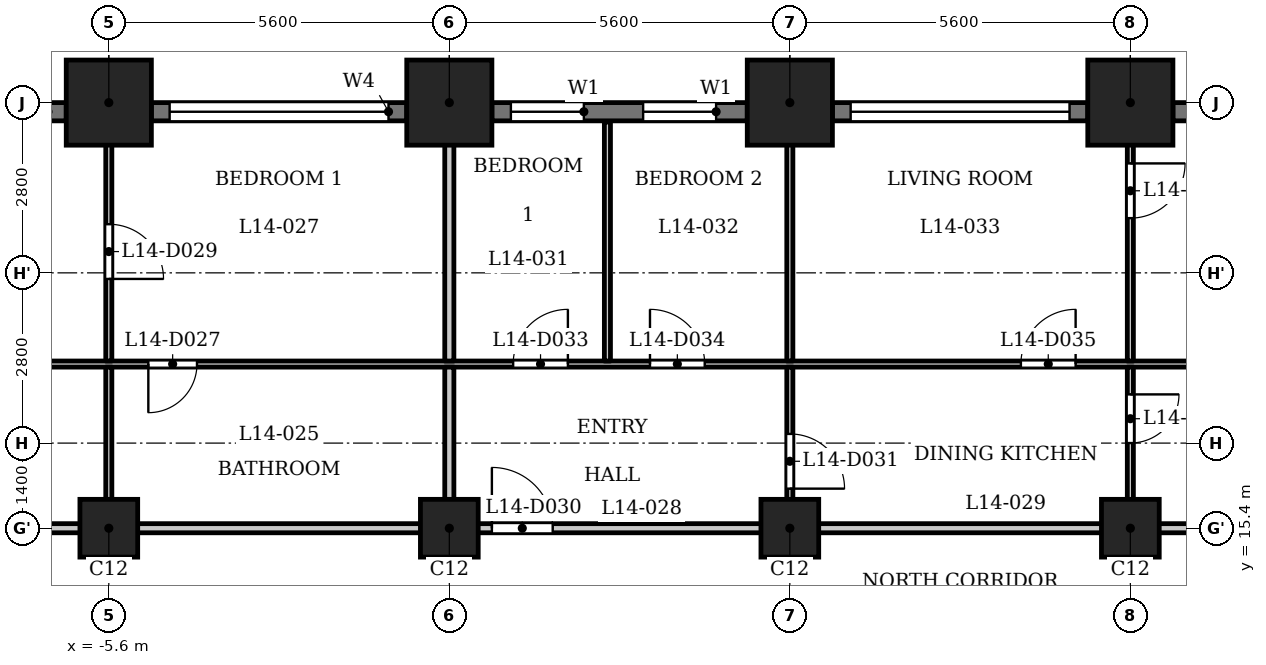
"""IFC4 building model, lengths in metres.
Left out: names, types, materials, properties, quantities, classifications, styles, units other than length and angle.
Written with IfcOpenShell. Run it as: python <this file> out.ifc"""

import sys

from ifc_helpers import new_model, si_unit, direction, frame, frame_2d, origin, origin_2d, place, context, subcontext, project, spatial, rectangle, extrude, element, fill, save


model = new_model("IFC4")
c1 = context("Model", 3, precision=1e-05, world=origin(), true_north=direction((0.0, 1.0)))
c2 = subcontext(c1, "Body", "Model", "MODEL_VIEW")
j1 = project(units=[si_unit("LENGTHUNIT", "METRE"), si_unit("PLANEANGLEUNIT", "RADIAN")], contexts=[c1])
p1 = place(None, origin())
s1 = spatial("IfcSite", under=j1, at=p1, CompositionType="ELEMENT")
p2 = place(p1, origin())
s2 = spatial("IfcBuilding", under=s1, at=p2, CompositionType="ELEMENT")
p3 = place(p2, frame((0.0, 0.0, 58.5)))
s3 = spatial("IfcBuildingStorey", under=s2, at=p3, CompositionType="ELEMENT", Elevation=58.5)
for number, where, z_axis, x_axis in (
    (1, (11.2, 22.4, 0.0), (0.0, 0.0, 1.0), (1.0, 0.0, 0.0)),
    (2, (5.6, 22.4, 0.0), (0.0, 0.0, 1.0), (1.0, 0.0, 0.0)),
    (3, (0.0, 22.4, 0.0), (0.0, 0.0, 1.0), (1.0, 0.0, 0.0)),
    (4, (-5.6, 22.4, 0.0), (0.0, 0.0, 1.0), (1.0, 0.0, 0.0)),
):
    element("IfcColumn", number, at=place(p3, frame(where, z_axis=z_axis, x_axis=x_axis)), inside=s3, PredefinedType="COLUMN", context=c2, shape_type="SweptSolid", body=[
        extrude(rectangle(XDim=1.4, YDim=1.4, at=origin_2d()), origin(), (0.0, 0.0, 1.0), 3.5),
    ])
for number, where, z_axis, x_axis in (
    (5, (-5.6, 15.4, 0.0), (0.0, 0.0, 1.0), (1.0, 0.0, 0.0)),
    (6, (0.0, 15.4, 0.0), (0.0, 0.0, 1.0), (1.0, 0.0, 0.0)),
    (7, (5.6, 15.4, 0.0), (0.0, 0.0, 1.0), (1.0, 0.0, 0.0)),
    (8, (11.2, 15.4, 0.0), (0.0, 0.0, 1.0), (1.0, 0.0, 0.0)),
):
    element("IfcColumn", number, at=place(p3, frame(where, z_axis=z_axis, x_axis=x_axis)), inside=s3, PredefinedType="COLUMN", context=c2, shape_type="SweptSolid", body=[
        extrude(rectangle(XDim=0.95, YDim=0.95, at=origin_2d()), origin(), (0.0, 0.0, 1.0), 3.5),
    ])
p4 = place(p3, frame((16.1, 22.25, 0.0), z_axis=(0.0, 0.0, 1.0), x_axis=(-1.0, 0.0, 0.0)))
e9 = element("IfcWall", 9, at=p4, inside=s3, PredefinedType="SOLIDWALL", context=c2, shape_type="SweptSolid", body=[
    extrude(rectangle(XDim=4.2, YDim=0.3, at=frame_2d((2.1, 0.0))), origin(), (0.0, 0.0, 1.0), 2.35),
])
p5 = place(p4, frame((0.3, 0.0, 1.2)))
e10 = element("IfcOpeningElement", 10, at=p5, cuts=e9, PredefinedType="OPENING", context=c2, shape_type="SweptSolid", body=[
    extrude(rectangle(XDim=3.6, YDim=0.95, at=frame_2d((1.8, 0.475))), frame((0.0, 0.16, 0.0), z_axis=(0.0, -1.0, 0.0), x_axis=(1.0, 0.0, 0.0)), (0.0, 0.0, 1.0), 0.32),
])
p6 = place(p3, frame((10.5, 22.25, 0.0), z_axis=(0.0, 0.0, 1.0), x_axis=(-1.0, 0.0, 0.0)))
e11 = element("IfcWall", 11, at=p6, inside=s3, PredefinedType="SOLIDWALL", context=c2, shape_type="SweptSolid", body=[
    extrude(rectangle(XDim=4.2, YDim=0.3, at=frame_2d((2.1, 0.0))), origin(), (0.0, 0.0, 1.0), 2.35),
])
p7 = place(p6, frame((0.3, 0.0, 1.2)))
e12 = element("IfcOpeningElement", 12, at=p7, cuts=e11, PredefinedType="OPENING", context=c2, shape_type="SweptSolid", body=[
    extrude(rectangle(XDim=3.6, YDim=0.95, at=frame_2d((1.8, 0.475))), frame((0.0, 0.16, 0.0), z_axis=(0.0, -1.0, 0.0), x_axis=(1.0, 0.0, 0.0)), (0.0, 0.0, 1.0), 0.32),
])
p8 = place(p3, frame((4.9, 22.25, 0.0), z_axis=(0.0, 0.0, 1.0), x_axis=(-1.0, 0.0, 0.0)))
e13 = element("IfcWall", 13, at=p8, inside=s3, PredefinedType="SOLIDWALL", context=c2, shape_type="SweptSolid", body=[
    extrude(rectangle(XDim=4.2, YDim=0.3, at=frame_2d((2.1, 0.0))), origin(), (0.0, 0.0, 1.0), 2.35),
])
p9 = place(p8, frame((0.512, 0.0, 0.6)))
e14 = element("IfcOpeningElement", 14, at=p9, cuts=e13, PredefinedType="OPENING", context=c2, shape_type="SweptSolid", body=[
    extrude(rectangle(XDim=1.2, YDim=1.55, at=frame_2d((0.6, 0.775))), frame((0.0, 0.16, 0.0), z_axis=(0.0, -1.0, 0.0), x_axis=(1.0, 0.0, 0.0)), (0.0, 0.0, 1.0), 0.32),
])
p10 = place(p8, frame((2.688, 0.0, 0.6)))
e15 = element("IfcOpeningElement", 15, at=p10, cuts=e13, PredefinedType="OPENING", context=c2, shape_type="SweptSolid", body=[
    extrude(rectangle(XDim=1.2, YDim=1.55, at=frame_2d((0.6, 0.775))), frame((0.0, 0.16, 0.0), z_axis=(0.0, -1.0, 0.0), x_axis=(1.0, 0.0, 0.0)), (0.0, 0.0, 1.0), 0.32),
])
p11 = place(p3, frame((-0.7, 22.25, 0.0), z_axis=(0.0, 0.0, 1.0), x_axis=(-1.0, 0.0, 0.0)))
e16 = element("IfcWall", 16, at=p11, inside=s3, PredefinedType="SOLIDWALL", context=c2, shape_type="SweptSolid", body=[
    extrude(rectangle(XDim=4.2, YDim=0.3, at=frame_2d((2.1, 0.0))), origin(), (0.0, 0.0, 1.0), 2.35),
])
p12 = place(p11, frame((0.3, 0.0, 1.2)))
e17 = element("IfcOpeningElement", 17, at=p12, cuts=e16, PredefinedType="OPENING", context=c2, shape_type="SweptSolid", body=[
    extrude(rectangle(XDim=3.6, YDim=0.95, at=frame_2d((1.8, 0.475))), frame((0.0, 0.16, 0.0), z_axis=(0.0, -1.0, 0.0), x_axis=(1.0, 0.0, 0.0)), (0.0, 0.0, 1.0), 0.32),
])
p13 = place(p3, frame((-6.3, 22.25, 0.0), z_axis=(0.0, 0.0, 1.0), x_axis=(-1.0, 0.0, 0.0)))
e18 = element("IfcWall", 18, at=p13, inside=s3, PredefinedType="SOLIDWALL", context=c2, shape_type="SweptSolid", body=[
    extrude(rectangle(XDim=4.2, YDim=0.3, at=frame_2d((2.1, 0.0))), origin(), (0.0, 0.0, 1.0), 2.35),
])
p14 = place(p13, frame((0.3, 0.0, 1.2)))
e19 = element("IfcOpeningElement", 19, at=p14, cuts=e18, PredefinedType="OPENING", context=c2, shape_type="SweptSolid", body=[
    extrude(rectangle(XDim=3.6, YDim=0.95, at=frame_2d((1.8, 0.475))), frame((0.0, 0.16, 0.0), z_axis=(0.0, -1.0, 0.0), x_axis=(1.0, 0.0, 0.0)), (0.0, 0.0, 1.0), 0.32),
])
p15 = place(p3, frame((-27.484, 15.4, 0.0), z_axis=(0.0, 0.0, 1.0), x_axis=(1.0, 0.0, 0.0)))
e20 = element("IfcWall", 20, at=p15, inside=s3, PredefinedType="PARTITIONING", context=c2, shape_type="SweptSolid", body=[
    extrude(rectangle(XDim=54.968, YDim=0.15, at=frame_2d((27.484, 0.0))), origin(), (0.0, 0.0, 1.0), 3.2),
])
p16 = place(p15, frame((8.784, 0.0, 0.0)))
e21 = element("IfcOpeningElement", 21, at=p16, cuts=e20, PredefinedType="OPENING", context=c2, shape_type="SweptSolid", body=[
    extrude(rectangle(XDim=1.0, YDim=2.1, at=frame_2d((0.5, 1.05))), frame((0.0, 0.085, 0.0), z_axis=(0.0, -1.0, 0.0), x_axis=(1.0, 0.0, 0.0)), (0.0, 0.0, 1.0), 0.17),
])
p17 = place(p15, frame((12.034, 0.0, 0.0)))
e22 = element("IfcOpeningElement", 22, at=p17, cuts=e20, PredefinedType="OPENING", context=c2, shape_type="SweptSolid", body=[
    extrude(rectangle(XDim=1.0, YDim=2.1, at=frame_2d((0.5, 1.05))), frame((0.0, 0.085, 0.0), z_axis=(0.0, -1.0, 0.0), x_axis=(1.0, 0.0, 0.0)), (0.0, 0.0, 1.0), 0.17),
])
p18 = place(p15, frame((16.984, 0.0, 0.0)))
e23 = element("IfcOpeningElement", 23, at=p18, cuts=e20, PredefinedType="OPENING", context=c2, shape_type="SweptSolid", body=[
    extrude(rectangle(XDim=1.0, YDim=2.1, at=frame_2d((0.5, 1.05))), frame((0.0, 0.085, 0.0), z_axis=(0.0, -1.0, 0.0), x_axis=(1.0, 0.0, 0.0)), (0.0, 0.0, 1.0), 0.17),
])
p19 = place(p15, frame((28.184, 0.0, 0.0)))
e24 = element("IfcOpeningElement", 24, at=p19, cuts=e20, PredefinedType="OPENING", context=c2, shape_type="SweptSolid", body=[
    extrude(rectangle(XDim=1.0, YDim=2.1, at=frame_2d((0.5, 1.05))), frame((0.0, 0.085, 0.0), z_axis=(0.0, -1.0, 0.0), x_axis=(1.0, 0.0, 0.0)), (0.0, 0.0, 1.0), 0.17),
])
p20 = place(p15, frame((48.234, 0.0, 0.0)))
e25 = element("IfcOpeningElement", 25, at=p20, cuts=e20, PredefinedType="OPENING", context=c2, shape_type="SweptSolid", body=[
    extrude(rectangle(XDim=1.0, YDim=2.1, at=frame_2d((0.5, 1.05))), frame((0.0, 0.085, 0.0), z_axis=(0.0, -1.0, 0.0), x_axis=(1.0, 0.0, 0.0)), (0.0, 0.0, 1.0), 0.17),
])
p21 = place(p3, frame((-26.44, 18.1, 0.0), z_axis=(0.0, 0.0, 1.0), x_axis=(1.0, 0.0, 0.0)))
e26 = element("IfcWall", 26, at=p21, inside=s3, PredefinedType="PARTITIONING", context=c2, shape_type="SweptSolid", body=[
    extrude(rectangle(XDim=52.63, YDim=0.1, at=frame_2d((26.315, 0.0))), origin(), (0.0, 0.0, 1.0), 3.2),
])
p22 = place(p21, frame((2.626, 0.0, 0.0)))
e27 = element("IfcOpeningElement", 27, at=p22, cuts=e26, PredefinedType="OPENING", context=c2, shape_type="SweptSolid", body=[
    extrude(rectangle(XDim=0.8, YDim=2.1, at=frame_2d((0.4, 1.05))), frame((0.0, 0.06, 0.0), z_axis=(0.0, -1.0, 0.0), x_axis=(1.0, 0.0, 0.0)), (0.0, 0.0, 1.0), 0.12),
])
p23 = place(p21, frame((7.84, 0.0, 0.0)))
e28 = element("IfcOpeningElement", 28, at=p23, cuts=e26, PredefinedType="OPENING", context=c2, shape_type="SweptSolid", body=[
    extrude(rectangle(XDim=0.9, YDim=2.1, at=frame_2d((0.45, 1.05))), frame((0.0, 0.06, 0.0), z_axis=(0.0, -1.0, 0.0), x_axis=(1.0, 0.0, 0.0)), (0.0, 0.0, 1.0), 0.12),
])
p24 = place(p21, frame((13.79, 0.0, 0.0)))
e29 = element("IfcOpeningElement", 29, at=p24, cuts=e26, PredefinedType="OPENING", context=c2, shape_type="SweptSolid", body=[
    extrude(rectangle(XDim=0.8, YDim=2.1, at=frame_2d((0.4, 1.05))), frame((0.0, 0.06, 0.0), z_axis=(0.0, -1.0, 0.0), x_axis=(1.0, 0.0, 0.0)), (0.0, 0.0, 1.0), 0.12),
])
p25 = place(p21, frame((11.09, 0.0, 0.0)))
e30 = element("IfcOpeningElement", 30, at=p25, cuts=e26, PredefinedType="OPENING", context=c2, shape_type="SweptSolid", body=[
    extrude(rectangle(XDim=0.9, YDim=2.1, at=frame_2d((0.45, 1.05))), frame((0.0, 0.06, 0.0), z_axis=(0.0, -1.0, 0.0), x_axis=(1.0, 0.0, 0.0)), (0.0, 0.0, 1.0), 0.12),
])
p26 = place(p21, frame((21.49, 0.0, 0.0)))
e31 = element("IfcOpeningElement", 31, at=p26, cuts=e26, PredefinedType="OPENING", context=c2, shape_type="SweptSolid", body=[
    extrude(rectangle(XDim=0.8, YDim=2.1, at=frame_2d((0.4, 1.05))), frame((0.0, 0.06, 0.0), z_axis=(0.0, -1.0, 0.0), x_axis=(1.0, 0.0, 0.0)), (0.0, 0.0, 1.0), 0.12),
])
p27 = place(p21, frame((15.79, 0.0, 0.0)))
e32 = element("IfcOpeningElement", 32, at=p27, cuts=e26, PredefinedType="OPENING", context=c2, shape_type="SweptSolid", body=[
    extrude(rectangle(XDim=0.9, YDim=2.1, at=frame_2d((0.45, 1.05))), frame((0.0, 0.06, 0.0), z_axis=(0.0, -1.0, 0.0), x_axis=(1.0, 0.0, 0.0)), (0.0, 0.0, 1.0), 0.12),
])
p28 = place(p21, frame((27.49, 0.0, 0.0)))
e33 = element("IfcOpeningElement", 33, at=p28, cuts=e26, PredefinedType="OPENING", context=c2, shape_type="SweptSolid", body=[
    extrude(rectangle(XDim=0.9, YDim=2.1, at=frame_2d((0.45, 1.05))), frame((0.0, 0.06, 0.0), z_axis=(0.0, -1.0, 0.0), x_axis=(1.0, 0.0, 0.0)), (0.0, 0.0, 1.0), 0.12),
])
p29 = place(p21, frame((29.74, 0.0, 0.0)))
e34 = element("IfcOpeningElement", 34, at=p29, cuts=e26, PredefinedType="OPENING", context=c2, shape_type="SweptSolid", body=[
    extrude(rectangle(XDim=0.9, YDim=2.1, at=frame_2d((0.45, 1.05))), frame((0.0, 0.06, 0.0), z_axis=(0.0, -1.0, 0.0), x_axis=(1.0, 0.0, 0.0)), (0.0, 0.0, 1.0), 0.12),
])
p30 = place(p21, frame((35.84, 0.0, 0.0)))
e35 = element("IfcOpeningElement", 35, at=p30, cuts=e26, PredefinedType="OPENING", context=c2, shape_type="SweptSolid", body=[
    extrude(rectangle(XDim=0.9, YDim=2.1, at=frame_2d((0.45, 1.05))), frame((0.0, 0.06, 0.0), z_axis=(0.0, -1.0, 0.0), x_axis=(1.0, 0.0, 0.0)), (0.0, 0.0, 1.0), 0.12),
])
p31 = place(p21, frame((50.74, 0.0, 0.0)))
e36 = element("IfcOpeningElement", 36, at=p31, cuts=e26, PredefinedType="OPENING", context=c2, shape_type="SweptSolid", body=[
    extrude(rectangle(XDim=0.8, YDim=2.1, at=frame_2d((0.4, 1.05))), frame((0.0, 0.06, 0.0), z_axis=(0.0, -1.0, 0.0), x_axis=(1.0, 0.0, 0.0)), (0.0, 0.0, 1.0), 0.12),
])
p32 = place(p21, frame((47.29, 0.0, 0.0)))
e37 = element("IfcOpeningElement", 37, at=p32, cuts=e26, PredefinedType="OPENING", context=c2, shape_type="SweptSolid", body=[
    extrude(rectangle(XDim=0.9, YDim=2.1, at=frame_2d((0.45, 1.05))), frame((0.0, 0.06, 0.0), z_axis=(0.0, -1.0, 0.0), x_axis=(1.0, 0.0, 0.0)), (0.0, 0.0, 1.0), 0.12),
])
p33 = place(p3, frame((-5.6, 15.475, 0.0), z_axis=(0.0, 0.0, 1.0), x_axis=(0.0, 1.0, 0.0)))
e38 = element("IfcWall", 38, at=p33, inside=s3, PredefinedType="PARTITIONING", context=c2, shape_type="SweptSolid", body=[
    extrude(rectangle(XDim=2.575, YDim=0.1, at=frame_2d((1.288, 0.0))), origin(), (0.0, 0.0, 1.0), 3.2),
])
p34 = place(p3, frame((-5.6, 18.15, 0.0), z_axis=(0.0, 0.0, 1.0), x_axis=(0.0, 1.0, 0.0)))
e39 = element("IfcWall", 39, at=p34, inside=s3, PredefinedType="PARTITIONING", context=c2, shape_type="SweptSolid", body=[
    extrude(rectangle(XDim=4.93, YDim=0.1, at=frame_2d((2.465, 0.0))), origin(), (0.0, 0.0, 1.0), 3.2),
])
p35 = place(p34, frame((1.35, 0.0, 0.0)))
e40 = element("IfcOpeningElement", 40, at=p35, cuts=e39, PredefinedType="OPENING", context=c2, shape_type="SweptSolid", body=[
    extrude(rectangle(XDim=0.9, YDim=2.1, at=frame_2d((0.45, 1.05))), frame((0.0, 0.06, 0.0), z_axis=(0.0, -1.0, 0.0), x_axis=(1.0, 0.0, 0.0)), (0.0, 0.0, 1.0), 0.12),
])
p36 = place(p3, frame((0.0, 15.475, 0.0), z_axis=(0.0, 0.0, 1.0), x_axis=(0.0, 1.0, 0.0)))
e41 = element("IfcWall", 41, at=p36, inside=s3, PredefinedType="PARTITIONING", context=c2, shape_type="SweptSolid", body=[
    extrude(rectangle(XDim=2.575, YDim=0.15, at=frame_2d((1.288, 0.0))), origin(), (0.0, 0.0, 1.0), 3.2),
])
p37 = place(p3, frame((0.0, 18.15, 0.0), z_axis=(0.0, 0.0, 1.0), x_axis=(0.0, 1.0, 0.0)))
e42 = element("IfcWall", 42, at=p37, inside=s3, PredefinedType="PARTITIONING", context=c2, shape_type="SweptSolid", body=[
    extrude(rectangle(XDim=4.93, YDim=0.15, at=frame_2d((2.465, 0.0))), origin(), (0.0, 0.0, 1.0), 3.2),
])
p38 = place(p3, frame((2.6, 18.15, 0.0), z_axis=(0.0, 0.0, 1.0), x_axis=(0.0, 1.0, 0.0)))
e43 = element("IfcWall", 43, at=p38, inside=s3, PredefinedType="PARTITIONING", context=c2, shape_type="SweptSolid", body=[
    extrude(rectangle(XDim=3.93, YDim=0.1, at=frame_2d((1.965, 0.0))), origin(), (0.0, 0.0, 1.0), 3.2),
])
p39 = place(p3, frame((5.6, 15.475, 0.0), z_axis=(0.0, 0.0, 1.0), x_axis=(0.0, 1.0, 0.0)))
e44 = element("IfcWall", 44, at=p39, inside=s3, PredefinedType="PARTITIONING", context=c2, shape_type="SweptSolid", body=[
    extrude(rectangle(XDim=2.575, YDim=0.1, at=frame_2d((1.288, 0.0))), origin(), (0.0, 0.0, 1.0), 3.2),
])
p40 = place(p39, frame((0.576, 0.0, 0.0)))
e45 = element("IfcOpeningElement", 45, at=p40, cuts=e44, PredefinedType="OPENING", context=c2, shape_type="SweptSolid", body=[
    extrude(rectangle(XDim=0.9, YDim=2.1, at=frame_2d((0.45, 1.05))), frame((0.0, 0.06, 0.0), z_axis=(0.0, -1.0, 0.0), x_axis=(1.0, 0.0, 0.0)), (0.0, 0.0, 1.0), 0.12),
])
p41 = place(p3, frame((5.6, 18.15, 0.0), z_axis=(0.0, 0.0, 1.0), x_axis=(0.0, 1.0, 0.0)))
e46 = element("IfcWall", 46, at=p41, inside=s3, PredefinedType="PARTITIONING", context=c2, shape_type="SweptSolid", body=[
    extrude(rectangle(XDim=4.93, YDim=0.1, at=frame_2d((2.465, 0.0))), origin(), (0.0, 0.0, 1.0), 3.2),
])
p42 = place(p3, frame((11.2, 15.475, 0.0), z_axis=(0.0, 0.0, 1.0), x_axis=(0.0, 1.0, 0.0)))
e47 = element("IfcWall", 47, at=p42, inside=s3, PredefinedType="PARTITIONING", context=c2, shape_type="SweptSolid", body=[
    extrude(rectangle(XDim=2.575, YDim=0.1, at=frame_2d((1.288, 0.0))), origin(), (0.0, 0.0, 1.0), 3.2),
])
p43 = place(p42, frame((1.326, 0.0, 0.0)))
e48 = element("IfcOpeningElement", 48, at=p43, cuts=e47, PredefinedType="OPENING", context=c2, shape_type="SweptSolid", body=[
    extrude(rectangle(XDim=0.8, YDim=2.1, at=frame_2d((0.4, 1.05))), frame((0.0, 0.06, 0.0), z_axis=(0.0, -1.0, 0.0), x_axis=(1.0, 0.0, 0.0)), (0.0, 0.0, 1.0), 0.12),
])
p44 = place(p3, frame((11.2, 18.15, 0.0), z_axis=(0.0, 0.0, 1.0), x_axis=(0.0, 1.0, 0.0)))
e49 = element("IfcWall", 49, at=p44, inside=s3, PredefinedType="PARTITIONING", context=c2, shape_type="SweptSolid", body=[
    extrude(rectangle(XDim=4.93, YDim=0.1, at=frame_2d((2.465, 0.0))), origin(), (0.0, 0.0, 1.0), 3.2),
])
p45 = place(p44, frame((2.35, 0.0, 0.0)))
e50 = element("IfcOpeningElement", 50, at=p45, cuts=e49, PredefinedType="OPENING", context=c2, shape_type="SweptSolid", body=[
    extrude(rectangle(XDim=0.9, YDim=2.1, at=frame_2d((0.45, 1.05))), frame((0.0, 0.06, 0.0), z_axis=(0.0, -1.0, 0.0), x_axis=(1.0, 0.0, 0.0)), (0.0, 0.0, 1.0), 0.12),
])
p46 = place(p26, origin())
e51 = element("IfcDoor", 51, at=p46, inside=s3, OperationType="SINGLE_SWING_LEFT", PredefinedType="DOOR", context=c2, shape_type="SweptSolid", body=[
    extrude(rectangle(XDim=0.8, YDim=2.1, at=frame_2d((0.4, 1.05))), frame((0.0, 0.025, 0.0), z_axis=(0.0, -1.0, 0.0), x_axis=(1.0, 0.0, 0.0)), (0.0, 0.0, 1.0), 0.05),
])
fill(e31, e51)
p47 = place(p35, origin())
e52 = element("IfcDoor", 52, at=p47, inside=s3, OperationType="SINGLE_SWING_LEFT", PredefinedType="DOOR", context=c2, shape_type="SweptSolid", body=[
    extrude(rectangle(XDim=0.9, YDim=2.1, at=frame_2d((0.45, 1.05))), frame((0.0, 0.025, 0.0), z_axis=(0.0, -1.0, 0.0), x_axis=(1.0, 0.0, 0.0)), (0.0, 0.0, 1.0), 0.05),
])
fill(e40, e52)
p48 = place(p19, origin())
e53 = element("IfcDoor", 53, at=p48, inside=s3, OperationType="SINGLE_SWING_RIGHT", PredefinedType="DOOR", context=c2, shape_type="SweptSolid", body=[
    extrude(rectangle(XDim=1.0, YDim=2.1, at=frame_2d((0.5, 1.05))), frame((0.0, 0.025, 0.0), z_axis=(0.0, -1.0, 0.0), x_axis=(1.0, 0.0, 0.0)), (0.0, 0.0, 1.0), 0.05),
])
fill(e24, e53)
p49 = place(p40, origin())
e54 = element("IfcDoor", 54, at=p49, inside=s3, OperationType="SINGLE_SWING_LEFT", PredefinedType="DOOR", context=c2, shape_type="SweptSolid", body=[
    extrude(rectangle(XDim=0.9, YDim=2.1, at=frame_2d((0.45, 1.05))), frame((0.0, 0.025, 0.0), z_axis=(0.0, -1.0, 0.0), x_axis=(1.0, 0.0, 0.0)), (0.0, 0.0, 1.0), 0.05),
])
fill(e45, e54)
p50 = place(p43, origin())
e55 = element("IfcDoor", 55, at=p50, inside=s3, OperationType="SINGLE_SWING_RIGHT", PredefinedType="DOOR", context=c2, shape_type="SweptSolid", body=[
    extrude(rectangle(XDim=0.8, YDim=2.1, at=frame_2d((0.4, 1.05))), frame((0.0, 0.025, 0.0), z_axis=(0.0, -1.0, 0.0), x_axis=(1.0, 0.0, 0.0)), (0.0, 0.0, 1.0), 0.05),
])
fill(e48, e55)
p51 = place(p28, origin())
e56 = element("IfcDoor", 56, at=p51, inside=s3, OperationType="SINGLE_SWING_LEFT", PredefinedType="DOOR", context=c2, shape_type="SweptSolid", body=[
    extrude(rectangle(XDim=0.9, YDim=2.1, at=frame_2d((0.45, 1.05))), frame((0.0, 0.025, 0.0), z_axis=(0.0, -1.0, 0.0), x_axis=(1.0, 0.0, 0.0)), (0.0, 0.0, 1.0), 0.05),
])
fill(e33, e56)
p52 = place(p29, origin())
e57 = element("IfcDoor", 57, at=p52, inside=s3, OperationType="SINGLE_SWING_RIGHT", PredefinedType="DOOR", context=c2, shape_type="SweptSolid", body=[
    extrude(rectangle(XDim=0.9, YDim=2.1, at=frame_2d((0.45, 1.05))), frame((0.0, 0.025, 0.0), z_axis=(0.0, -1.0, 0.0), x_axis=(1.0, 0.0, 0.0)), (0.0, 0.0, 1.0), 0.05),
])
fill(e34, e57)
p53 = place(p30, origin())
e58 = element("IfcDoor", 58, at=p53, inside=s3, OperationType="SINGLE_SWING_LEFT", PredefinedType="DOOR", context=c2, shape_type="SweptSolid", body=[
    extrude(rectangle(XDim=0.9, YDim=2.1, at=frame_2d((0.45, 1.05))), frame((0.0, 0.025, 0.0), z_axis=(0.0, -1.0, 0.0), x_axis=(1.0, 0.0, 0.0)), (0.0, 0.0, 1.0), 0.05),
])
fill(e35, e58)
p54 = place(p45, origin())
e59 = element("IfcDoor", 59, at=p54, inside=s3, OperationType="SINGLE_SWING_RIGHT", PredefinedType="DOOR", context=c2, shape_type="SweptSolid", body=[
    extrude(rectangle(XDim=0.9, YDim=2.1, at=frame_2d((0.45, 1.05))), frame((0.0, 0.025, 0.0), z_axis=(0.0, -1.0, 0.0), x_axis=(1.0, 0.0, 0.0)), (0.0, 0.0, 1.0), 0.05),
])
fill(e50, e59)
p55 = place(p7, origin())
e60 = element("IfcWindow", 60, at=p55, inside=s3, PartitioningType="SINGLE_PANEL", PredefinedType="WINDOW", context=c2, shape_type="SweptSolid", body=[
    extrude(rectangle(XDim=3.6, YDim=0.95, at=frame_2d((1.8, 0.475))), frame((0.0, 0.03, 0.0), z_axis=(0.0, -1.0, 0.0), x_axis=(1.0, 0.0, 0.0)), (0.0, 0.0, 1.0), 0.06),
])
fill(e12, e60)
p56 = place(p9, origin())
e61 = element("IfcWindow", 61, at=p56, inside=s3, PartitioningType="SINGLE_PANEL", PredefinedType="WINDOW", context=c2, shape_type="SweptSolid", body=[
    extrude(rectangle(XDim=1.2, YDim=1.55, at=frame_2d((0.6, 0.775))), frame((0.0, 0.03, 0.0), z_axis=(0.0, -1.0, 0.0), x_axis=(1.0, 0.0, 0.0)), (0.0, 0.0, 1.0), 0.06),
])
fill(e14, e61)
p57 = place(p10, origin())
e62 = element("IfcWindow", 62, at=p57, inside=s3, PartitioningType="SINGLE_PANEL", PredefinedType="WINDOW", context=c2, shape_type="SweptSolid", body=[
    extrude(rectangle(XDim=1.2, YDim=1.55, at=frame_2d((0.6, 0.775))), frame((0.0, 0.03, 0.0), z_axis=(0.0, -1.0, 0.0), x_axis=(1.0, 0.0, 0.0)), (0.0, 0.0, 1.0), 0.06),
])
fill(e15, e62)
p58 = place(p12, origin())
e63 = element("IfcWindow", 63, at=p58, inside=s3, PartitioningType="SINGLE_PANEL", PredefinedType="WINDOW", context=c2, shape_type="SweptSolid", body=[
    extrude(rectangle(XDim=3.6, YDim=0.95, at=frame_2d((1.8, 0.475))), frame((0.0, 0.03, 0.0), z_axis=(0.0, -1.0, 0.0), x_axis=(1.0, 0.0, 0.0)), (0.0, 0.0, 1.0), 0.06),
])
fill(e17, e63)
save(model, sys.argv[1])
